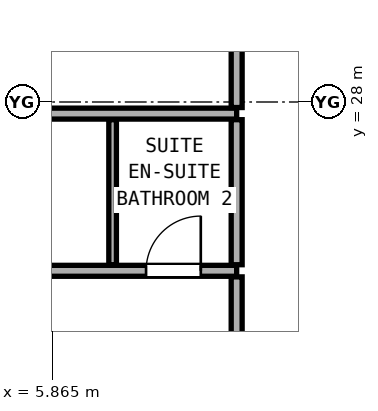
"""IFC4 building model, lengths in metres.
Left out: names, types, materials, properties, quantities, classifications, styles, units other than length and angle.
Written with IfcOpenShell. Run it as: python <this file> out.ifc"""

import sys

from ifc_helpers import new_model, si_unit, direction, frame, frame_2d, origin, place, context, subcontext, project, spatial, rectangle, extrude, element, fill, save


model = new_model("IFC4")
c1 = context("Model", 3, precision=1e-05, world=origin(), true_north=direction((0.0, 1.0)))
c2 = subcontext(c1, "Body", "Model", "MODEL_VIEW")
j1 = project(units=[si_unit("LENGTHUNIT", "METRE"), si_unit("PLANEANGLEUNIT", "RADIAN")], contexts=[c1])
p1 = place(None, origin())
s1 = spatial("IfcSite", under=j1, at=p1, CompositionType="ELEMENT")
p2 = place(p1, origin())
s2 = spatial("IfcBuilding", under=s1, at=p2, CompositionType="ELEMENT")
p3 = place(p2, frame((0.0, 0.0, 104.9)))
s3 = spatial("IfcBuildingStorey", under=s2, at=p3, CompositionType="ELEMENT", Elevation=104.9)
p4 = place(p3, frame((-1.13, 25.224, 0.0), z_axis=(0.0, 0.0, 1.0), x_axis=(1.0, 0.0, 0.0)))
e1 = element("IfcWall", 1, at=p4, inside=s3, PredefinedType="PARTITIONING", context=c2, shape_type="SweptSolid", body=[
    extrude(rectangle(XDim=10.03, YDim=0.18, at=frame_2d((5.015, 0.0))), origin(), (0.0, 0.0, 1.0), 2.145),
])
p5 = place(p4, frame((4.19, 0.0, 0.0)))
e2 = element("IfcOpeningElement", 2, at=p5, cuts=e1, PredefinedType="OPENING", context=c2, shape_type="SweptSolid", body=[
    extrude(rectangle(XDim=0.85, YDim=2.01, at=frame_2d((0.425, 1.005))), frame((0.0, 0.1, 0.0), z_axis=(0.0, -1.0, 0.0), x_axis=(1.0, 0.0, 0.0)), (0.0, 0.0, 1.0), 0.2),
])
p6 = place(p4, frame((8.54, 0.0, 0.0)))
e3 = element("IfcOpeningElement", 3, at=p6, cuts=e1, PredefinedType="OPENING", context=c2, shape_type="SweptSolid", body=[
    extrude(rectangle(XDim=0.9, YDim=2.1, at=frame_2d((0.45, 1.05))), frame((0.0, 0.1, 0.0), z_axis=(0.0, -1.0, 0.0), x_axis=(1.0, 0.0, 0.0)), (0.0, 0.0, 1.0), 0.2),
])
p7 = place(p3, frame((-1.13, 27.809, 0.0), z_axis=(0.0, 0.0, 1.0), x_axis=(1.0, 0.0, 0.0)))
e4 = element("IfcWall", 4, at=p7, inside=s3, PredefinedType="PARTITIONING", context=c2, shape_type="SweptSolid", body=[
    extrude(rectangle(XDim=10.03, YDim=0.18, at=frame_2d((5.015, 0.0))), origin(), (0.0, 0.0, 1.0), 2.145),
])
p8 = place(p3, frame((6.86, 25.324, 0.0), z_axis=(0.0, 0.0, 1.0), x_axis=(0.0, 1.0, 0.0)))
e5 = element("IfcWall", 5, at=p8, inside=s3, PredefinedType="PARTITIONING", context=c2, shape_type="SweptSolid", body=[
    extrude(rectangle(XDim=2.385, YDim=0.125, at=frame_2d((1.192, 0.0))), origin(), (0.0, 0.0, 1.0), 3.08),
])
p9 = place(p3, frame((8.9, 21.978, 0.0), z_axis=(0.0, 0.0, 1.0), x_axis=(0.0, 1.0, 0.0)))
e6 = element("IfcWall", 6, at=p9, inside=s3, PredefinedType="PARTITIONING", context=c2, shape_type="SweptSolid", body=[
    extrude(rectangle(XDim=3.146, YDim=0.18, at=frame_2d((1.573, 0.0))), origin(), (0.0, 0.0, 1.0), 2.299),
])
p10 = place(p9, frame((1.048, 0.0, 0.0)))
e7 = element("IfcOpeningElement", 7, at=p10, cuts=e6, PredefinedType="OPENING", context=c2, shape_type="SweptSolid", body=[
    extrude(rectangle(XDim=1.05, YDim=2.2, at=frame_2d((0.525, 1.1))), frame((0.0, 0.1, 0.0), z_axis=(0.0, -1.0, 0.0), x_axis=(1.0, 0.0, 0.0)), (0.0, 0.0, 1.0), 0.2),
])
p11 = place(p3, frame((8.9, 25.324, 0.0), z_axis=(0.0, 0.0, 1.0), x_axis=(0.0, 1.0, 0.0)))
e8 = element("IfcWall", 8, at=p11, inside=s3, PredefinedType="PARTITIONING", context=c2, shape_type="SweptSolid", body=[
    extrude(rectangle(XDim=2.385, YDim=0.18, at=frame_2d((1.192, 0.0))), origin(), (0.0, 0.0, 1.0), 3.08),
])
p12 = place(p3, frame((8.9, 27.909, 0.0), z_axis=(0.0, 0.0, 1.0), x_axis=(0.0, 1.0, 0.0)))
e9 = element("IfcWall", 9, at=p12, inside=s3, PredefinedType="PARTITIONING", context=c2, shape_type="SweptSolid", body=[
    extrude(rectangle(XDim=3.584, YDim=0.18, at=frame_2d((1.792, 0.0))), origin(), (0.0, 0.0, 1.0), 2.299),
])
p13 = place(p12, frame((1.267, 0.0, 0.0)))
e10 = element("IfcOpeningElement", 10, at=p13, cuts=e9, PredefinedType="OPENING", context=c2, shape_type="SweptSolid", body=[
    extrude(rectangle(XDim=1.05, YDim=2.2, at=frame_2d((0.525, 1.1))), frame((0.0, 0.1, 0.0), z_axis=(0.0, -1.0, 0.0), x_axis=(1.0, 0.0, 0.0)), (0.0, 0.0, 1.0), 0.2),
])
p14 = place(p6, origin())
e11 = element("IfcDoor", 11, at=p14, inside=s3, OperationType="SINGLE_SWING_RIGHT", PredefinedType="DOOR", context=c2, shape_type="SweptSolid", body=[
    extrude(rectangle(XDim=0.9, YDim=2.1, at=frame_2d((0.45, 1.05))), frame((0.0, 0.025, 0.0), z_axis=(0.0, -1.0, 0.0), x_axis=(1.0, 0.0, 0.0)), (0.0, 0.0, 1.0), 0.05),
])
fill(e3, e11)
save(model, sys.argv[1])
